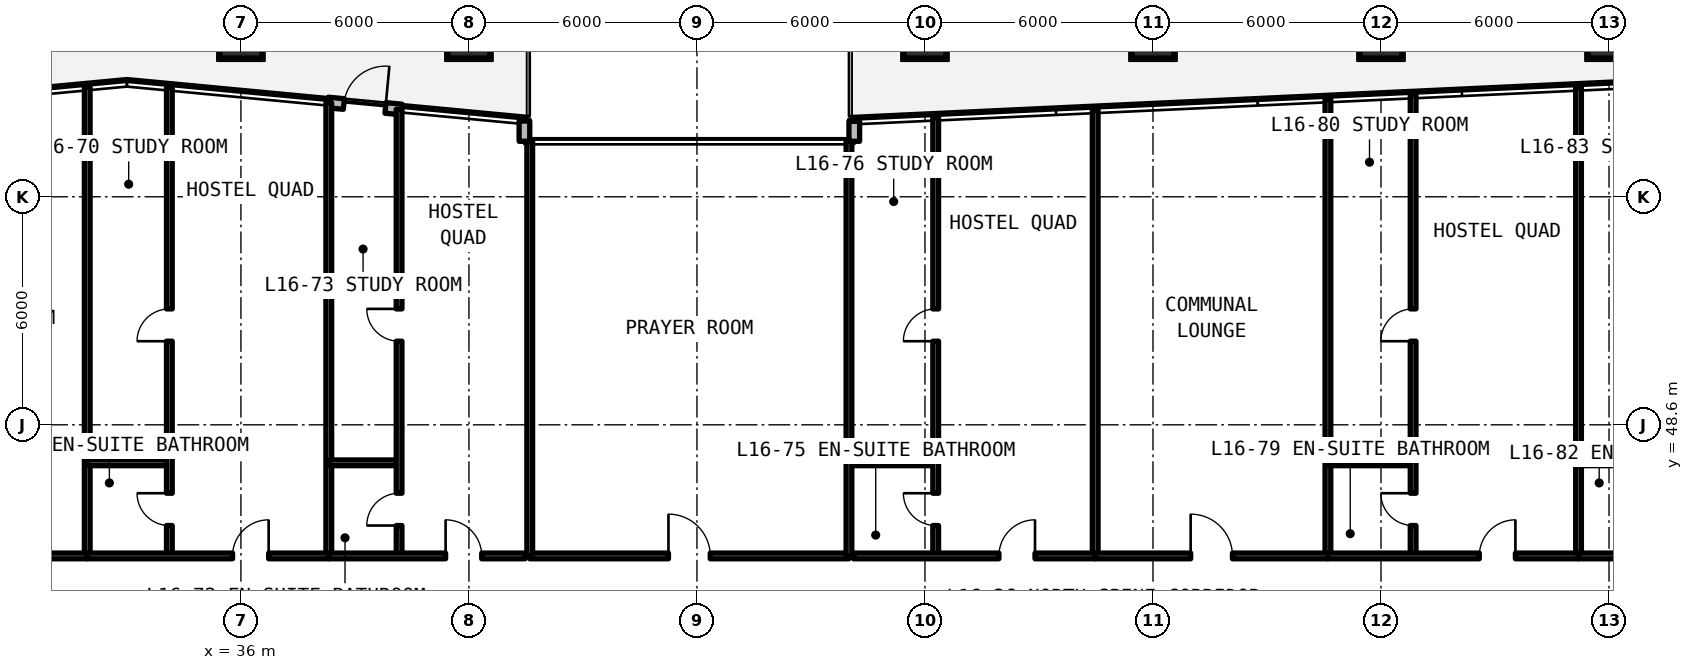
"""IFC4 building model, lengths in metres.
Left out: names, types, materials, properties, quantities, classifications, styles, units other than length and angle.
Written with IfcOpenShell. Run it as: python <this file> out.ifc"""

import sys

from ifc_helpers import new_model, si_unit, direction, frame, frame_2d, origin, origin_2d, place, context, subcontext, project, spatial, rectangle, extrude, element, fill, save


model = new_model("IFC4")
c1 = context("Model", 3, precision=1e-05, world=origin(), true_north=direction((0.0, 1.0)))
c2 = subcontext(c1, "Body", "Model", "MODEL_VIEW")
j1 = project(units=[si_unit("LENGTHUNIT", "METRE"), si_unit("PLANEANGLEUNIT", "RADIAN")], contexts=[c1])
p1 = place(None, origin())
s1 = spatial("IfcSite", under=j1, at=p1, CompositionType="ELEMENT")
p2 = place(p1, origin())
s2 = spatial("IfcBuilding", under=s1, at=p2, CompositionType="ELEMENT")
p3 = place(p2, frame((0.0, 0.0, 58.74)))
s3 = spatial("IfcBuildingStorey", under=s2, at=p3, CompositionType="ELEMENT", Elevation=58.74)
for number, where, z_axis, x_axis in (
    (1, (36.0, 58.8, 0.0), (0.0, 0.0, 1.0), (1.0, 0.0, 0.0)),
    (2, (42.0, 58.8, 0.0), (0.0, 0.0, 1.0), (1.0, 0.0, 0.0)),
    (3, (54.0, 58.8, 0.0), (0.0, 0.0, 1.0), (1.0, 0.0, 0.0)),
    (4, (60.0, 58.8, 0.0), (0.0, 0.0, 1.0), (1.0, 0.0, 0.0)),
    (5, (66.0, 58.8, 0.0), (0.0, 0.0, 1.0), (1.0, 0.0, 0.0)),
    (6, (72.0, 58.8, 0.0), (0.0, 0.0, 1.0), (1.0, 0.0, 0.0)),
):
    element("IfcColumn", number, at=place(p3, frame(where, z_axis=z_axis, x_axis=x_axis)), inside=s3, PredefinedType="COLUMN", context=c2, shape_type="SweptSolid", body=[
        extrude(rectangle(XDim=1.1, YDim=1.1, at=origin_2d()), origin(), (0.0, 0.0, 1.0), 3.63),
    ])
p4 = place(p3, frame((52.14, 56.586, 0.0), z_axis=(0.0, 0.0, 1.0), x_axis=(0.0, -1.0, 0.0)))
e7 = element("IfcWall", 7, at=p4, inside=s3, PredefinedType="SOLIDWALL", context=c2, shape_type="SweptSolid", body=[
    extrude(rectangle(XDim=0.526, YDim=0.28, at=frame_2d((0.263, 0.0))), origin(), (0.0, 0.0, 1.0), 3.41),
])
p5 = place(p3, frame((43.46, 56.06, 0.0), z_axis=(0.0, 0.0, 1.0), x_axis=(0.0, 1.0, 0.0)))
e8 = element("IfcWall", 8, at=p5, inside=s3, PredefinedType="SOLIDWALL", context=c2, shape_type="SweptSolid", body=[
    extrude(rectangle(XDim=0.532, YDim=0.28, at=frame_2d((0.266, 0.0))), origin(), (0.0, 0.0, 1.0), 3.41),
])
p6 = place(p3, frame((40.224, 56.898, 0.0), z_axis=(0.0, 0.0, 1.0), x_axis=(-0.995575739283, 0.093962478418, 0.0)))
e9 = element("IfcWall", 9, at=p6, inside=s3, PredefinedType="SOLIDWALL", context=c2, shape_type="SweptSolid", body=[
    extrude(rectangle(XDim=1.946, YDim=0.28, at=frame_2d((0.973, 0.0))), origin(), (0.0, 0.0, 1.0), 3.41),
])
p7 = place(p6, frame((0.423, 0.0, 0.0)))
e10 = element("IfcOpeningElement", 10, at=p7, cuts=e9, PredefinedType="OPENING", context=c2, shape_type="SweptSolid", body=[
    extrude(rectangle(XDim=1.1, YDim=2.15, at=frame_2d((0.55, 1.075))), frame((0.0, 0.15, 0.0), z_axis=(0.0, -1.0, 0.0), x_axis=(1.0, 0.0, 0.0)), (0.0, 0.0, 1.0), 0.3),
])
p8 = place(p3, frame((43.6, 45.15, 0.0), z_axis=(0.0, 0.0, 1.0), x_axis=(1.0, 0.0, 0.0)))
e11 = element("IfcWall", 11, at=p8, inside=s3, PredefinedType="SOLIDWALL", context=c2, shape_type="SweptSolid", body=[
    extrude(rectangle(XDim=8.4, YDim=0.15, at=frame_2d((4.2, 0.0))), origin(), (0.0, 0.0, 1.0), 2.63),
])
p9 = place(p8, frame((3.65, 0.0, 0.0)))
e12 = element("IfcOpeningElement", 12, at=p9, cuts=e11, PredefinedType="OPENING", context=c2, shape_type="SweptSolid", body=[
    extrude(rectangle(XDim=1.1, YDim=2.15, at=frame_2d((0.55, 1.075))), frame((0.0, 0.085, 0.0), z_axis=(0.0, -1.0, 0.0), x_axis=(1.0, 0.0, 0.0)), (0.0, 0.0, 1.0), 0.17),
])
for number, where, z_axis, x_axis in (
    (13, (43.6, 45.15, 0.0), (0.0, 0.0, 1.0), (0.0, 1.0, 0.0)),
    (14, (52.0, 45.15, 0.0), (0.0, 0.0, 1.0), (0.0, 1.0, 0.0)),
):
    element("IfcWall", number, at=place(p3, frame(where, z_axis=z_axis, x_axis=x_axis)), inside=s3, PredefinedType="SOLIDWALL", context=c2, shape_type="SweptSolid", body=[
        extrude(rectangle(XDim=10.91, YDim=0.15, at=frame_2d((5.455, 0.0))), origin(), (0.0, 0.0, 1.0), 2.63),
    ])
p10 = place(p3, frame((31.956, 45.15, 0.0), z_axis=(0.0, 0.0, 1.0), x_axis=(0.0, 1.0, 0.0)))
e15 = element("IfcWall", 15, at=p10, inside=s3, PredefinedType="SOLIDWALL", context=c2, shape_type="SweptSolid", body=[
    extrude(rectangle(XDim=12.331, YDim=0.15, at=frame_2d((6.166, 0.0))), origin(), (0.0, 0.0, 1.0), 2.63),
])
p11 = place(p3, frame((26.581, 45.15, 0.0), z_axis=(0.0, 0.0, 1.0), x_axis=(1.0, 0.0, 0.0)))
e16 = element("IfcWall", 16, at=p11, inside=s3, PredefinedType="SOLIDWALL", context=c2, shape_type="SweptSolid", body=[
    extrude(rectangle(XDim=5.375, YDim=0.15, at=frame_2d((2.687, 0.0))), origin(), (0.0, 0.0, 1.0), 2.63),
])
p12 = place(p11, frame((2.137, 0.0, 0.0)))
e17 = element("IfcOpeningElement", 17, at=p12, cuts=e16, PredefinedType="OPENING", context=c2, shape_type="SweptSolid", body=[
    extrude(rectangle(XDim=1.1, YDim=2.15, at=frame_2d((0.55, 1.075))), frame((0.0, 0.085, 0.0), z_axis=(0.0, -1.0, 0.0), x_axis=(1.0, 0.0, 0.0)), (0.0, 0.0, 1.0), 0.17),
])
p13 = place(p3, frame((38.312, 45.15, 0.0), z_axis=(0.0, 0.0, 1.0), x_axis=(0.0, 1.0, 0.0)))
e18 = element("IfcWall", 18, at=p13, inside=s3, PredefinedType="SOLIDWALL", context=c2, shape_type="SweptSolid", body=[
    extrude(rectangle(XDim=11.928, YDim=0.15, at=frame_2d((5.964, 0.0))), origin(), (0.0, 0.0, 1.0), 2.63),
])
p14 = place(p3, frame((31.956, 47.6, 0.0), z_axis=(0.0, 0.0, 1.0), x_axis=(1.0, 0.0, 0.0)))
e19 = element("IfcWall", 19, at=p14, inside=s3, PredefinedType="PARTITIONING", context=c2, shape_type="SweptSolid", body=[
    extrude(rectangle(XDim=2.161, YDim=0.15, at=frame_2d((1.081, 0.0))), origin(), (0.0, 0.0, 1.0), 2.63),
])
p15 = place(p3, frame((34.117, 45.15, 0.0), z_axis=(0.0, 0.0, 1.0), x_axis=(0.0, 1.0, 0.0)))
e20 = element("IfcWall", 20, at=p15, inside=s3, PredefinedType="PARTITIONING", context=c2, shape_type="SweptSolid", body=[
    extrude(rectangle(XDim=12.324, YDim=0.15, at=frame_2d((6.162, 0.0))), origin(), (0.0, 0.0, 1.0), 2.63),
])
p16 = place(p15, frame((0.8, 0.0, 0.0)))
e21 = element("IfcOpeningElement", 21, at=p16, cuts=e20, PredefinedType="OPENING", context=c2, shape_type="SweptSolid", body=[
    extrude(rectangle(XDim=0.85, YDim=2.1, at=frame_2d((0.425, 1.05))), frame((0.0, 0.085, 0.0), z_axis=(0.0, -1.0, 0.0), x_axis=(1.0, 0.0, 0.0)), (0.0, 0.0, 1.0), 0.17),
])
p17 = place(p15, frame((5.65, 0.0, 0.0)))
e22 = element("IfcOpeningElement", 22, at=p17, cuts=e20, PredefinedType="OPENING", context=c2, shape_type="SweptSolid", body=[
    extrude(rectangle(XDim=0.85, YDim=2.1, at=frame_2d((0.425, 1.05))), frame((0.0, 0.085, 0.0), z_axis=(0.0, -1.0, 0.0), x_axis=(1.0, 0.0, 0.0)), (0.0, 0.0, 1.0), 0.17),
])
p18 = place(p3, frame((31.956, 45.15, 0.0), z_axis=(0.0, 0.0, 1.0), x_axis=(1.0, 0.0, 0.0)))
e23 = element("IfcWall", 23, at=p18, inside=s3, PredefinedType="SOLIDWALL", context=c2, shape_type="SweptSolid", body=[
    extrude(rectangle(XDim=6.356, YDim=0.15, at=frame_2d((3.178, 0.0))), origin(), (0.0, 0.0, 1.0), 2.63),
])
p19 = place(p18, frame((3.824, 0.0, 0.0)))
e24 = element("IfcOpeningElement", 24, at=p19, cuts=e23, PredefinedType="OPENING", context=c2, shape_type="SweptSolid", body=[
    extrude(rectangle(XDim=0.95, YDim=2.15, at=frame_2d((0.475, 1.075))), frame((0.0, 0.085, 0.0), z_axis=(0.0, -1.0, 0.0), x_axis=(1.0, 0.0, 0.0)), (0.0, 0.0, 1.0), 0.17),
])
p20 = place(p3, frame((38.312, 47.6, 0.0), z_axis=(0.0, 0.0, 1.0), x_axis=(1.0, 0.0, 0.0)))
e25 = element("IfcWall", 25, at=p20, inside=s3, PredefinedType="PARTITIONING", context=c2, shape_type="SweptSolid", body=[
    extrude(rectangle(XDim=1.85, YDim=0.15, at=frame_2d((0.925, 0.0))), origin(), (0.0, 0.0, 1.0), 2.63),
])
p21 = place(p3, frame((40.162, 45.15, 0.0), z_axis=(0.0, 0.0, 1.0), x_axis=(0.0, 1.0, 0.0)))
e26 = element("IfcWall", 26, at=p21, inside=s3, PredefinedType="PARTITIONING", context=c2, shape_type="SweptSolid", body=[
    extrude(rectangle(XDim=11.754, YDim=0.15, at=frame_2d((5.877, 0.0))), origin(), (0.0, 0.0, 1.0), 2.63),
])
p22 = place(p21, frame((0.8, 0.0, 0.0)))
e27 = element("IfcOpeningElement", 27, at=p22, cuts=e26, PredefinedType="OPENING", context=c2, shape_type="SweptSolid", body=[
    extrude(rectangle(XDim=0.85, YDim=2.1, at=frame_2d((0.425, 1.05))), frame((0.0, 0.085, 0.0), z_axis=(0.0, -1.0, 0.0), x_axis=(1.0, 0.0, 0.0)), (0.0, 0.0, 1.0), 0.17),
])
p23 = place(p21, frame((5.65, 0.0, 0.0)))
e28 = element("IfcOpeningElement", 28, at=p23, cuts=e26, PredefinedType="OPENING", context=c2, shape_type="SweptSolid", body=[
    extrude(rectangle(XDim=0.85, YDim=2.1, at=frame_2d((0.425, 1.05))), frame((0.0, 0.085, 0.0), z_axis=(0.0, -1.0, 0.0), x_axis=(1.0, 0.0, 0.0)), (0.0, 0.0, 1.0), 0.17),
])
p24 = place(p3, frame((38.312, 45.15, 0.0), z_axis=(0.0, 0.0, 1.0), x_axis=(1.0, 0.0, 0.0)))
e29 = element("IfcWall", 29, at=p24, inside=s3, PredefinedType="SOLIDWALL", context=c2, shape_type="SweptSolid", body=[
    extrude(rectangle(XDim=5.168, YDim=0.15, at=frame_2d((2.584, 0.0))), origin(), (0.0, 0.0, 1.0), 2.63),
])
p25 = place(p24, frame((3.074, 0.0, 0.0)))
e30 = element("IfcOpeningElement", 30, at=p25, cuts=e29, PredefinedType="OPENING", context=c2, shape_type="SweptSolid", body=[
    extrude(rectangle(XDim=0.95, YDim=2.15, at=frame_2d((0.475, 1.075))), frame((0.0, 0.085, 0.0), z_axis=(0.0, -1.0, 0.0), x_axis=(1.0, 0.0, 0.0)), (0.0, 0.0, 1.0), 0.17),
])
p26 = place(p3, frame((58.479, 45.15, 0.0), z_axis=(0.0, 0.0, 1.0), x_axis=(0.0, 1.0, 0.0)))
e31 = element("IfcWall", 31, at=p26, inside=s3, PredefinedType="SOLIDWALL", context=c2, shape_type="SweptSolid", body=[
    extrude(rectangle(XDim=11.731, YDim=0.15, at=frame_2d((5.866, 0.0))), origin(), (0.0, 0.0, 1.0), 2.63),
])
p27 = place(p3, frame((52.12, 47.6, 0.0), z_axis=(0.0, 0.0, 1.0), x_axis=(1.0, 0.0, 0.0)))
e32 = element("IfcWall", 32, at=p27, inside=s3, PredefinedType="PARTITIONING", context=c2, shape_type="SweptSolid", body=[
    extrude(rectangle(XDim=2.162, YDim=0.15, at=frame_2d((1.081, 0.0))), origin(), (0.0, 0.0, 1.0), 2.63),
])
p28 = place(p3, frame((54.282, 45.15, 0.0), z_axis=(0.0, 0.0, 1.0), x_axis=(0.0, 1.0, 0.0)))
e33 = element("IfcWall", 33, at=p28, inside=s3, PredefinedType="PARTITIONING", context=c2, shape_type="SweptSolid", body=[
    extrude(rectangle(XDim=11.536, YDim=0.15, at=frame_2d((5.768, 0.0))), origin(), (0.0, 0.0, 1.0), 2.63),
])
p29 = place(p28, frame((0.8, 0.0, 0.0)))
e34 = element("IfcOpeningElement", 34, at=p29, cuts=e33, PredefinedType="OPENING", context=c2, shape_type="SweptSolid", body=[
    extrude(rectangle(XDim=0.85, YDim=2.1, at=frame_2d((0.425, 1.05))), frame((0.0, 0.085, 0.0), z_axis=(0.0, -1.0, 0.0), x_axis=(1.0, 0.0, 0.0)), (0.0, 0.0, 1.0), 0.17),
])
p30 = place(p28, frame((5.65, 0.0, 0.0)))
e35 = element("IfcOpeningElement", 35, at=p30, cuts=e33, PredefinedType="OPENING", context=c2, shape_type="SweptSolid", body=[
    extrude(rectangle(XDim=0.85, YDim=2.1, at=frame_2d((0.425, 1.05))), frame((0.0, 0.085, 0.0), z_axis=(0.0, -1.0, 0.0), x_axis=(1.0, 0.0, 0.0)), (0.0, 0.0, 1.0), 0.17),
])
p31 = place(p3, frame((52.12, 45.15, 0.0), z_axis=(0.0, 0.0, 1.0), x_axis=(1.0, 0.0, 0.0)))
e36 = element("IfcWall", 36, at=p31, inside=s3, PredefinedType="SOLIDWALL", context=c2, shape_type="SweptSolid", body=[
    extrude(rectangle(XDim=6.359, YDim=0.15, at=frame_2d((3.18, 0.0))), origin(), (0.0, 0.0, 1.0), 2.63),
])
p32 = place(p31, frame((3.826, 0.0, 0.0)))
e37 = element("IfcOpeningElement", 37, at=p32, cuts=e36, PredefinedType="OPENING", context=c2, shape_type="SweptSolid", body=[
    extrude(rectangle(XDim=0.95, YDim=2.15, at=frame_2d((0.475, 1.075))), frame((0.0, 0.085, 0.0), z_axis=(0.0, -1.0, 0.0), x_axis=(1.0, 0.0, 0.0)), (0.0, 0.0, 1.0), 0.17),
])
p33 = place(p3, frame((64.603, 45.15, 0.0), z_axis=(0.0, 0.0, 1.0), x_axis=(0.0, 1.0, 0.0)))
e38 = element("IfcWall", 38, at=p33, inside=s3, PredefinedType="SOLIDWALL", context=c2, shape_type="SweptSolid", body=[
    extrude(rectangle(XDim=12.016, YDim=0.15, at=frame_2d((6.008, 0.0))), origin(), (0.0, 0.0, 1.0), 2.63),
])
p34 = place(p3, frame((58.479, 45.15, 0.0), z_axis=(0.0, 0.0, 1.0), x_axis=(1.0, 0.0, 0.0)))
e39 = element("IfcWall", 39, at=p34, inside=s3, PredefinedType="SOLIDWALL", context=c2, shape_type="SweptSolid", body=[
    extrude(rectangle(XDim=6.124, YDim=0.15, at=frame_2d((3.062, 0.0))), origin(), (0.0, 0.0, 1.0), 2.63),
])
p35 = place(p34, frame((2.512, 0.0, 0.0)))
e40 = element("IfcOpeningElement", 40, at=p35, cuts=e39, PredefinedType="OPENING", context=c2, shape_type="SweptSolid", body=[
    extrude(rectangle(XDim=1.1, YDim=2.15, at=frame_2d((0.55, 1.075))), frame((0.0, 0.085, 0.0), z_axis=(0.0, -1.0, 0.0), x_axis=(1.0, 0.0, 0.0)), (0.0, 0.0, 1.0), 0.17),
])
p36 = place(p3, frame((71.198, 45.15, 0.0), z_axis=(0.0, 0.0, 1.0), x_axis=(0.0, 1.0, 0.0)))
e41 = element("IfcWall", 41, at=p36, inside=s3, PredefinedType="SOLIDWALL", context=c2, shape_type="SweptSolid", body=[
    extrude(rectangle(XDim=12.323, YDim=0.15, at=frame_2d((6.162, 0.0))), origin(), (0.0, 0.0, 1.0), 2.63),
])
p37 = place(p3, frame((64.603, 47.6, 0.0), z_axis=(0.0, 0.0, 1.0), x_axis=(1.0, 0.0, 0.0)))
e42 = element("IfcWall", 42, at=p37, inside=s3, PredefinedType="PARTITIONING", context=c2, shape_type="SweptSolid", body=[
    extrude(rectangle(XDim=2.242, YDim=0.15, at=frame_2d((1.121, 0.0))), origin(), (0.0, 0.0, 1.0), 2.63),
])
p38 = place(p3, frame((66.845, 45.15, 0.0), z_axis=(0.0, 0.0, 1.0), x_axis=(0.0, 1.0, 0.0)))
e43 = element("IfcWall", 43, at=p38, inside=s3, PredefinedType="PARTITIONING", context=c2, shape_type="SweptSolid", body=[
    extrude(rectangle(XDim=12.12, YDim=0.15, at=frame_2d((6.06, 0.0))), origin(), (0.0, 0.0, 1.0), 2.63),
])
p39 = place(p38, frame((0.8, 0.0, 0.0)))
e44 = element("IfcOpeningElement", 44, at=p39, cuts=e43, PredefinedType="OPENING", context=c2, shape_type="SweptSolid", body=[
    extrude(rectangle(XDim=0.85, YDim=2.1, at=frame_2d((0.425, 1.05))), frame((0.0, 0.085, 0.0), z_axis=(0.0, -1.0, 0.0), x_axis=(1.0, 0.0, 0.0)), (0.0, 0.0, 1.0), 0.17),
])
p40 = place(p38, frame((5.65, 0.0, 0.0)))
e45 = element("IfcOpeningElement", 45, at=p40, cuts=e43, PredefinedType="OPENING", context=c2, shape_type="SweptSolid", body=[
    extrude(rectangle(XDim=0.85, YDim=2.1, at=frame_2d((0.425, 1.05))), frame((0.0, 0.085, 0.0), z_axis=(0.0, -1.0, 0.0), x_axis=(1.0, 0.0, 0.0)), (0.0, 0.0, 1.0), 0.17),
])
p41 = place(p3, frame((64.603, 45.15, 0.0), z_axis=(0.0, 0.0, 1.0), x_axis=(1.0, 0.0, 0.0)))
e46 = element("IfcWall", 46, at=p41, inside=s3, PredefinedType="SOLIDWALL", context=c2, shape_type="SweptSolid", body=[
    extrude(rectangle(XDim=6.595, YDim=0.15, at=frame_2d((3.297, 0.0))), origin(), (0.0, 0.0, 1.0), 2.63),
])
p42 = place(p41, frame((3.984, 0.0, 0.0)))
e47 = element("IfcOpeningElement", 47, at=p42, cuts=e46, PredefinedType="OPENING", context=c2, shape_type="SweptSolid", body=[
    extrude(rectangle(XDim=0.95, YDim=2.15, at=frame_2d((0.475, 1.075))), frame((0.0, 0.085, 0.0), z_axis=(0.0, -1.0, 0.0), x_axis=(1.0, 0.0, 0.0)), (0.0, 0.0, 1.0), 0.17),
])
p43 = place(p3, frame((71.198, 47.6, 0.0), z_axis=(0.0, 0.0, 1.0), x_axis=(1.0, 0.0, 0.0)))
e48 = element("IfcWall", 48, at=p43, inside=s3, PredefinedType="PARTITIONING", context=c2, shape_type="SweptSolid", body=[
    extrude(rectangle(XDim=2.082, YDim=0.15, at=frame_2d((1.041, 0.0))), origin(), (0.0, 0.0, 1.0), 2.63),
])
p44 = place(p3, frame((71.198, 45.15, 0.0), z_axis=(0.0, 0.0, 1.0), x_axis=(1.0, 0.0, 0.0)))
e49 = element("IfcWall", 49, at=p44, inside=s3, PredefinedType="SOLIDWALL", context=c2, shape_type="SweptSolid", body=[
    extrude(rectangle(XDim=6.124, YDim=0.15, at=frame_2d((3.062, 0.0))), origin(), (0.0, 0.0, 1.0), 2.63),
])
p45 = place(p44, frame((3.668, 0.0, 0.0)))
e50 = element("IfcOpeningElement", 50, at=p45, cuts=e49, PredefinedType="OPENING", context=c2, shape_type="SweptSolid", body=[
    extrude(rectangle(XDim=0.95, YDim=2.15, at=frame_2d((0.475, 1.075))), frame((0.0, 0.085, 0.0), z_axis=(0.0, -1.0, 0.0), x_axis=(1.0, 0.0, 0.0)), (0.0, 0.0, 1.0), 0.17),
])
p46 = place(p7, frame((1.1, 0.0, 0.0), z_axis=(0.0, 0.0, 1.0), x_axis=(-1.0, 0.0, 0.0)))
e51 = element("IfcDoor", 51, at=p46, inside=s3, OperationType="SINGLE_SWING_LEFT", PredefinedType="DOOR", context=c2, shape_type="SweptSolid", body=[
    extrude(rectangle(XDim=1.1, YDim=2.15, at=frame_2d((0.55, 1.075))), frame((0.0, 0.025, 0.0), z_axis=(0.0, -1.0, 0.0), x_axis=(1.0, 0.0, 0.0)), (0.0, 0.0, 1.0), 0.05),
])
fill(e10, e51)
p47 = place(p9, origin())
e52 = element("IfcDoor", 52, at=p47, inside=s3, OperationType="SINGLE_SWING_LEFT", PredefinedType="DOOR", context=c2, shape_type="SweptSolid", body=[
    extrude(rectangle(XDim=1.1, YDim=2.15, at=frame_2d((0.55, 1.075))), frame((0.0, 0.025, 0.0), z_axis=(0.0, -1.0, 0.0), x_axis=(1.0, 0.0, 0.0)), (0.0, 0.0, 1.0), 0.05),
])
fill(e12, e52)
p48 = place(p16, origin())
e53 = element("IfcDoor", 53, at=p48, inside=s3, OperationType="SINGLE_SWING_RIGHT", PredefinedType="DOOR", context=c2, shape_type="SweptSolid", body=[
    extrude(rectangle(XDim=0.85, YDim=2.1, at=frame_2d((0.425, 1.05))), frame((0.0, 0.025, 0.0), z_axis=(0.0, -1.0, 0.0), x_axis=(1.0, 0.0, 0.0)), (0.0, 0.0, 1.0), 0.05),
])
fill(e21, e53)
p49 = place(p17, origin())
e54 = element("IfcDoor", 54, at=p49, inside=s3, OperationType="SINGLE_SWING_LEFT", PredefinedType="DOOR", context=c2, shape_type="SweptSolid", body=[
    extrude(rectangle(XDim=0.85, YDim=2.1, at=frame_2d((0.425, 1.05))), frame((0.0, 0.025, 0.0), z_axis=(0.0, -1.0, 0.0), x_axis=(1.0, 0.0, 0.0)), (0.0, 0.0, 1.0), 0.05),
])
fill(e22, e54)
p50 = place(p19, origin())
e55 = element("IfcDoor", 55, at=p50, inside=s3, OperationType="SINGLE_SWING_RIGHT", PredefinedType="DOOR", context=c2, shape_type="SweptSolid", body=[
    extrude(rectangle(XDim=0.95, YDim=2.15, at=frame_2d((0.475, 1.075))), frame((0.0, 0.025, 0.0), z_axis=(0.0, -1.0, 0.0), x_axis=(1.0, 0.0, 0.0)), (0.0, 0.0, 1.0), 0.05),
])
fill(e24, e55)
p51 = place(p22, origin())
e56 = element("IfcDoor", 56, at=p51, inside=s3, OperationType="SINGLE_SWING_LEFT", PredefinedType="DOOR", context=c2, shape_type="SweptSolid", body=[
    extrude(rectangle(XDim=0.85, YDim=2.1, at=frame_2d((0.425, 1.05))), frame((0.0, 0.025, 0.0), z_axis=(0.0, -1.0, 0.0), x_axis=(1.0, 0.0, 0.0)), (0.0, 0.0, 1.0), 0.05),
])
fill(e27, e56)
p52 = place(p23, origin())
e57 = element("IfcDoor", 57, at=p52, inside=s3, OperationType="SINGLE_SWING_RIGHT", PredefinedType="DOOR", context=c2, shape_type="SweptSolid", body=[
    extrude(rectangle(XDim=0.85, YDim=2.1, at=frame_2d((0.425, 1.05))), frame((0.0, 0.025, 0.0), z_axis=(0.0, -1.0, 0.0), x_axis=(1.0, 0.0, 0.0)), (0.0, 0.0, 1.0), 0.05),
])
fill(e28, e57)
p53 = place(p25, origin())
e58 = element("IfcDoor", 58, at=p53, inside=s3, OperationType="SINGLE_SWING_LEFT", PredefinedType="DOOR", context=c2, shape_type="SweptSolid", body=[
    extrude(rectangle(XDim=0.95, YDim=2.15, at=frame_2d((0.475, 1.075))), frame((0.0, 0.025, 0.0), z_axis=(0.0, -1.0, 0.0), x_axis=(1.0, 0.0, 0.0)), (0.0, 0.0, 1.0), 0.05),
])
fill(e30, e58)
p54 = place(p29, origin())
e59 = element("IfcDoor", 59, at=p54, inside=s3, OperationType="SINGLE_SWING_RIGHT", PredefinedType="DOOR", context=c2, shape_type="SweptSolid", body=[
    extrude(rectangle(XDim=0.85, YDim=2.1, at=frame_2d((0.425, 1.05))), frame((0.0, 0.025, 0.0), z_axis=(0.0, -1.0, 0.0), x_axis=(1.0, 0.0, 0.0)), (0.0, 0.0, 1.0), 0.05),
])
fill(e34, e59)
p55 = place(p30, origin())
e60 = element("IfcDoor", 60, at=p55, inside=s3, OperationType="SINGLE_SWING_LEFT", PredefinedType="DOOR", context=c2, shape_type="SweptSolid", body=[
    extrude(rectangle(XDim=0.85, YDim=2.1, at=frame_2d((0.425, 1.05))), frame((0.0, 0.025, 0.0), z_axis=(0.0, -1.0, 0.0), x_axis=(1.0, 0.0, 0.0)), (0.0, 0.0, 1.0), 0.05),
])
fill(e35, e60)
p56 = place(p32, origin())
e61 = element("IfcDoor", 61, at=p56, inside=s3, OperationType="SINGLE_SWING_RIGHT", PredefinedType="DOOR", context=c2, shape_type="SweptSolid", body=[
    extrude(rectangle(XDim=0.95, YDim=2.15, at=frame_2d((0.475, 1.075))), frame((0.0, 0.025, 0.0), z_axis=(0.0, -1.0, 0.0), x_axis=(1.0, 0.0, 0.0)), (0.0, 0.0, 1.0), 0.05),
])
fill(e37, e61)
p57 = place(p35, origin())
e62 = element("IfcDoor", 62, at=p57, inside=s3, OperationType="SINGLE_SWING_LEFT", PredefinedType="DOOR", context=c2, shape_type="SweptSolid", body=[
    extrude(rectangle(XDim=1.1, YDim=2.15, at=frame_2d((0.55, 1.075))), frame((0.0, 0.025, 0.0), z_axis=(0.0, -1.0, 0.0), x_axis=(1.0, 0.0, 0.0)), (0.0, 0.0, 1.0), 0.05),
])
fill(e40, e62)
p58 = place(p39, origin())
e63 = element("IfcDoor", 63, at=p58, inside=s3, OperationType="SINGLE_SWING_RIGHT", PredefinedType="DOOR", context=c2, shape_type="SweptSolid", body=[
    extrude(rectangle(XDim=0.85, YDim=2.1, at=frame_2d((0.425, 1.05))), frame((0.0, 0.025, 0.0), z_axis=(0.0, -1.0, 0.0), x_axis=(1.0, 0.0, 0.0)), (0.0, 0.0, 1.0), 0.05),
])
fill(e44, e63)
p59 = place(p40, origin())
e64 = element("IfcDoor", 64, at=p59, inside=s3, OperationType="SINGLE_SWING_LEFT", PredefinedType="DOOR", context=c2, shape_type="SweptSolid", body=[
    extrude(rectangle(XDim=0.85, YDim=2.1, at=frame_2d((0.425, 1.05))), frame((0.0, 0.025, 0.0), z_axis=(0.0, -1.0, 0.0), x_axis=(1.0, 0.0, 0.0)), (0.0, 0.0, 1.0), 0.05),
])
fill(e45, e64)
p60 = place(p42, origin())
e65 = element("IfcDoor", 65, at=p60, inside=s3, OperationType="SINGLE_SWING_RIGHT", PredefinedType="DOOR", context=c2, shape_type="SweptSolid", body=[
    extrude(rectangle(XDim=0.95, YDim=2.15, at=frame_2d((0.475, 1.075))), frame((0.0, 0.025, 0.0), z_axis=(0.0, -1.0, 0.0), x_axis=(1.0, 0.0, 0.0)), (0.0, 0.0, 1.0), 0.05),
])
fill(e47, e65)
save(model, sys.argv[1])
